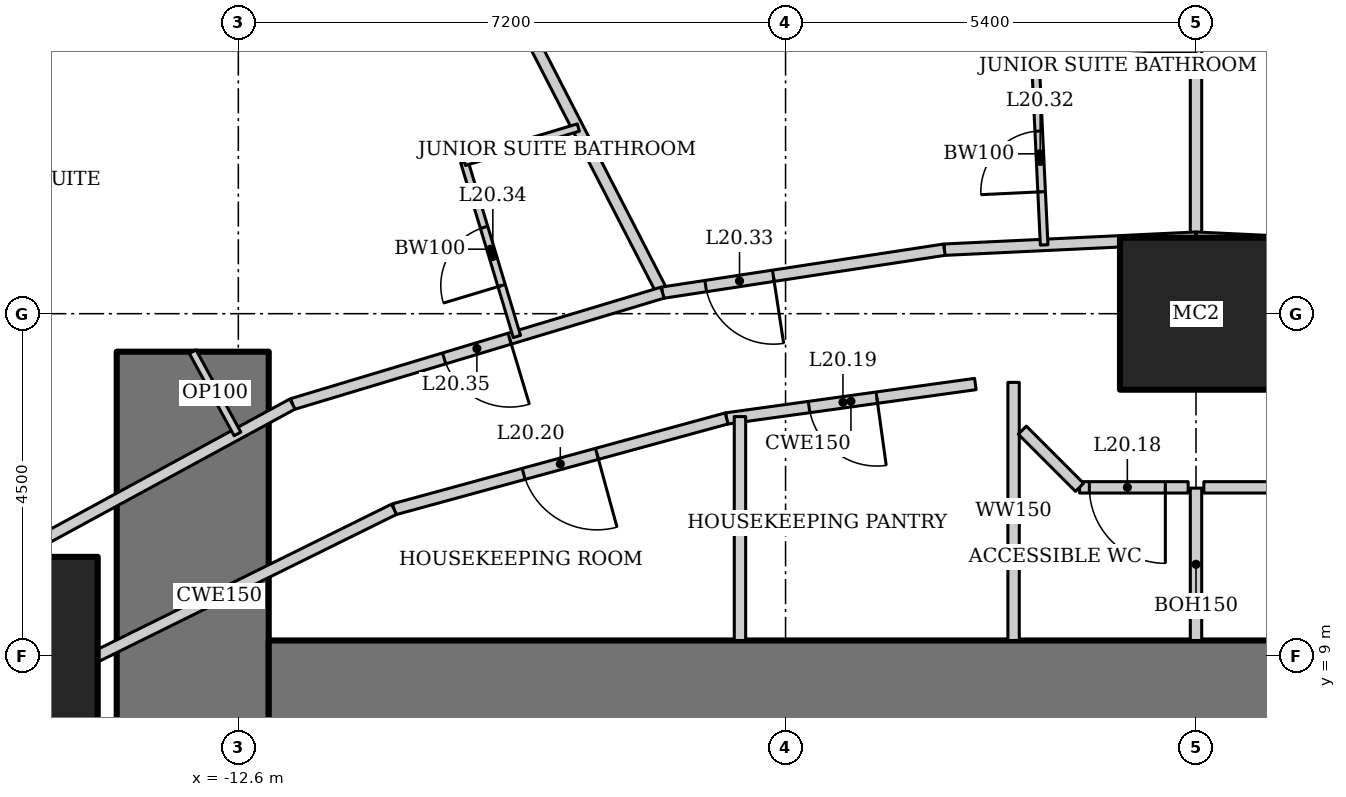
"""IFC4 building model, lengths in metres.
Left out: names, types, materials, properties, quantities, classifications, styles, units other than length and angle.
Written with IfcOpenShell. Run it as: python <this file> out.ifc"""

import sys

from ifc_helpers import new_model, si_unit, direction, frame, frame_2d, origin, origin_2d, place, context, subcontext, project, spatial, rectangle, hollow_rectangle, extrude, element, fill, save


model = new_model("IFC4")
c1 = context("Model", 3, precision=1e-05, world=origin(), true_north=direction((0.0, 1.0)))
c2 = subcontext(c1, "Body", "Model", "MODEL_VIEW")
j1 = project(units=[si_unit("LENGTHUNIT", "METRE"), si_unit("PLANEANGLEUNIT", "RADIAN")], contexts=[c1])
p1 = place(None, origin())
s1 = spatial("IfcSite", under=j1, at=p1, CompositionType="ELEMENT")
p2 = place(p1, origin())
s2 = spatial("IfcBuilding", under=s1, at=p2, CompositionType="ELEMENT")
p3 = place(p2, frame((0.0, 0.0, 87.4)))
s3 = spatial("IfcBuildingStorey", under=s2, at=p3, CompositionType="ELEMENT", Elevation=87.4)
p4 = place(p3, frame((0.0, 13.5, 0.0), z_axis=(0.0, 0.0, 1.0), x_axis=(1.0, 0.0, 0.0)))
e1 = element("IfcColumn", 1, at=p4, inside=s3, PredefinedType="COLUMN", context=c2, shape_type="SweptSolid", body=[
    extrude(hollow_rectangle(XDim=2.0, YDim=2.0, WallThickness=0.17, at=origin_2d()), origin(), (0.0, 0.0, 1.0), 3.6),
])
p5 = place(p3, frame((-15.75, 9.0, 0.0), z_axis=(0.0, 0.0, 1.0), x_axis=(1.0, 0.0, 0.0)))
e2 = element("IfcColumn", 2, at=p5, inside=s3, PredefinedType="COLUMN", context=c2, shape_type="SweptSolid", body=[
    extrude(hollow_rectangle(XDim=2.6, YDim=2.6, WallThickness=0.13, at=origin_2d()), origin(), (0.0, 0.0, 1.0), 3.6),
])
p6 = place(p3, frame((-13.2, 13.0, 0.0), z_axis=(0.0, 0.0, 1.0), x_axis=(0.0, -1.0, 0.0)))
e3 = element("IfcWall", 3, at=p6, inside=s3, PredefinedType="SHEAR", context=c2, shape_type="SweptSolid", body=[
    extrude(rectangle(XDim=26.0, YDim=2.0, at=frame_2d((13.0, 0.0))), origin(), (0.0, 0.0, 1.0), 3.6),
])
p7 = place(p6, frame((12.1, 0.0, 0.0)))
e4 = element("IfcOpeningElement", 4, at=p7, cuts=e3, PredefinedType="OPENING", context=c2, shape_type="SweptSolid", body=[
    extrude(rectangle(XDim=1.8, YDim=2.1, at=frame_2d((0.9, 1.05))), frame((0.0, 1.01, 0.0), z_axis=(0.0, -1.0, 0.0), x_axis=(1.0, 0.0, 0.0)), (0.0, 0.0, 1.0), 2.02),
])
p8 = place(p3, frame((12.2, 8.0, 0.0), z_axis=(0.0, 0.0, 1.0), x_axis=(-1.0, 0.0, 0.0)))
e5 = element("IfcWall", 5, at=p8, inside=s3, PredefinedType="SHEAR", context=c2, shape_type="SweptSolid", body=[
    extrude(rectangle(XDim=24.4, YDim=2.4, at=frame_2d((12.2, 0.0))), origin(), (0.0, 0.0, 1.0), 3.6),
])
p9 = place(p3, frame((0.0, 22.825, 0.0), z_axis=(0.0, 0.0, 1.0), x_axis=(0.0, -1.0, 0.0)))
e6 = element("IfcWall", 6, at=p9, inside=s3, PredefinedType="PARTITIONING", context=c2, shape_type="SweptSolid", body=[
    extrude(rectangle(XDim=8.325, YDim=0.15, at=frame_2d((4.162, 0.0))), origin(), (0.0, 0.0, 1.0), 2.924),
])
p10 = place(p3, frame((-10.912, 21.346, 0.0), z_axis=(0.0, 0.0, 1.0), x_axis=(0.457327273085, -0.889298468059, 0.0)))
e7 = element("IfcWall", 7, at=p10, inside=s3, PredefinedType="PARTITIONING", context=c2, shape_type="SweptSolid", body=[
    extrude(rectangle(XDim=8.511, YDim=0.15, at=frame_2d((4.256, 0.0))), origin(), (0.0, 0.0, 1.0), 2.528),
])
p11 = place(p3, frame((3.311, 14.342, 0.0), z_axis=(0.0, 0.0, 1.0), x_axis=(-0.998863968075, 0.047652631422, 0.0)))
e8 = element("IfcWall", 8, at=p11, inside=s3, PredefinedType="PARTITIONING", context=c2, shape_type="SweptSolid", body=[
    extrude(rectangle(XDim=3.315, YDim=0.15, at=frame_2d((1.657, 0.0))), origin(), (0.0, 0.0, 1.0), 3.45),
])
p12 = place(p11, frame((0.15, 0.0, 0.0)))
e9 = element("IfcOpeningElement", 9, at=p12, cuts=e8, PredefinedType="OPENING", context=c2, shape_type="SweptSolid", body=[
    extrude(rectangle(XDim=0.9, YDim=2.1, at=frame_2d((0.45, 1.05))), frame((0.0, 0.085, 0.0), z_axis=(0.0, -1.0, 0.0), x_axis=(1.0, 0.0, 0.0)), (0.0, 0.0, 1.0), 0.17),
])
p13 = place(p3, frame((0.0, 14.5, 0.0), z_axis=(0.0, 0.0, 1.0), x_axis=(-0.998863968075, -0.047652631422, 0.0)))
e10 = element("IfcWall", 10, at=p13, inside=s3, PredefinedType="PARTITIONING", context=c2, shape_type="SweptSolid", body=[
    extrude(rectangle(XDim=3.315, YDim=0.15, at=frame_2d((1.657, 0.0))), origin(), (0.0, 0.0, 1.0), 3.45),
])
p14 = place(p3, frame((-3.311, 14.342, 0.0), z_axis=(0.0, 0.0, 1.0), x_axis=(-0.988564270062, -0.150800145746, 0.0)))
e11 = element("IfcWall", 11, at=p14, inside=s3, PredefinedType="PARTITIONING", context=c2, shape_type="SweptSolid", body=[
    extrude(rectangle(XDim=3.751, YDim=0.15, at=frame_2d((1.875, 0.0))), origin(), (0.0, 0.0, 1.0), 3.45),
])
p15 = place(p14, frame((2.276, 0.0, 0.0)))
e12 = element("IfcOpeningElement", 12, at=p15, cuts=e11, PredefinedType="OPENING", context=c2, shape_type="SweptSolid", body=[
    extrude(rectangle(XDim=0.9, YDim=2.1, at=frame_2d((0.45, 1.05))), frame((0.0, 0.085, 0.0), z_axis=(0.0, -1.0, 0.0), x_axis=(1.0, 0.0, 0.0)), (0.0, 0.0, 1.0), 0.17),
])
p16 = place(p3, frame((-7.019, 13.776, 0.0), z_axis=(0.0, 0.0, 1.0), x_axis=(-0.957564241242, -0.288219922793, 0.0)))
e13 = element("IfcWall", 13, at=p16, inside=s3, PredefinedType="PARTITIONING", context=c2, shape_type="SweptSolid", body=[
    extrude(rectangle(XDim=5.085, YDim=0.15, at=frame_2d((2.542, 0.0))), origin(), (0.0, 0.0, 1.0), 3.45),
])
p17 = place(p16, frame((2.1, 0.0, 0.0)))
e14 = element("IfcOpeningElement", 14, at=p17, cuts=e13, PredefinedType="OPENING", context=c2, shape_type="SweptSolid", body=[
    extrude(rectangle(XDim=0.9, YDim=2.1, at=frame_2d((0.45, 1.05))), frame((0.0, 0.085, 0.0), z_axis=(0.0, -1.0, 0.0), x_axis=(1.0, 0.0, 0.0)), (0.0, 0.0, 1.0), 0.17),
])
p18 = place(p3, frame((-11.888, 12.311, 0.0), z_axis=(0.0, 0.0, 1.0), x_axis=(-0.878450059298, -0.477834169267, 0.0)))
e15 = element("IfcWall", 15, at=p18, inside=s3, PredefinedType="PARTITIONING", context=c2, shape_type="SweptSolid", body=[
    extrude(rectangle(XDim=5.631, YDim=0.15, at=frame_2d((2.815, 0.0))), origin(), (0.0, 0.0, 1.0), 3.45),
])
p19 = place(p3, frame((-2.903, 12.574, 0.0), z_axis=(0.0, 0.0, 1.0), x_axis=(-0.990563451353, -0.137054911782, 0.0)))
e16 = element("IfcWall", 16, at=p19, inside=s3, PredefinedType="PARTITIONING", context=c2, shape_type="SweptSolid", body=[
    extrude(rectangle(XDim=3.304, YDim=0.15, at=frame_2d((1.652, 0.0))), origin(), (0.0, 0.0, 1.0), 3.45),
])
p20 = place(p19, frame((1.308, 0.0, 0.0)))
e17 = element("IfcOpeningElement", 17, at=p20, cuts=e16, PredefinedType="OPENING", context=c2, shape_type="SweptSolid", body=[
    extrude(rectangle(XDim=0.9, YDim=2.1, at=frame_2d((0.45, 1.05))), frame((0.0, 0.085, 0.0), z_axis=(0.0, -1.0, 0.0), x_axis=(1.0, 0.0, 0.0)), (0.0, 0.0, 1.0), 0.17),
])
p21 = place(p3, frame((-6.176, 12.122, 0.0), z_axis=(0.0, 0.0, 1.0), x_axis=(-0.964644466646, -0.263554648923, 0.0)))
e18 = element("IfcWall", 18, at=p21, inside=s3, PredefinedType="PARTITIONING", context=c2, shape_type="SweptSolid", body=[
    extrude(rectangle(XDim=4.535, YDim=0.15, at=frame_2d((2.268, 0.0))), origin(), (0.0, 0.0, 1.0), 3.45),
])
p22 = place(p21, frame((1.768, 0.0, 0.0)))
e19 = element("IfcOpeningElement", 19, at=p22, cuts=e18, PredefinedType="OPENING", context=c2, shape_type="SweptSolid", body=[
    extrude(rectangle(XDim=1.0, YDim=2.1, at=frame_2d((0.5, 1.05))), frame((0.0, 0.085, 0.0), z_axis=(0.0, -1.0, 0.0), x_axis=(1.0, 0.0, 0.0)), (0.0, 0.0, 1.0), 0.17),
])
p23 = place(p3, frame((-10.551, 10.926, 0.0), z_axis=(0.0, 0.0, 1.0), x_axis=(-0.89656943448, -0.442903205177, 0.0)))
e20 = element("IfcWall", 20, at=p23, inside=s3, PredefinedType="PARTITIONING", context=c2, shape_type="SweptSolid", body=[
    extrude(rectangle(XDim=5.126, YDim=0.15, at=frame_2d((2.563, 0.0))), origin(), (0.0, 0.0, 1.0), 3.45),
])
p24 = place(p3, frame((-2.4, 9.2, 0.0), z_axis=(0.0, 0.0, 1.0), x_axis=(0.0, 1.0, 0.0)))
e21 = element("IfcWall", 21, at=p24, inside=s3, PredefinedType="SOLIDWALL", context=c2, shape_type="SweptSolid", body=[
    extrude(rectangle(XDim=3.396, YDim=0.15, at=frame_2d((1.698, 0.0))), origin(), (0.0, 0.0, 1.0), 2.767),
])
p25 = place(p3, frame((-6.0, 9.2, 0.0), z_axis=(0.0, 0.0, 1.0), x_axis=(0.0, 1.0, 0.0)))
e22 = element("IfcWall", 22, at=p25, inside=s3, PredefinedType="SOLIDWALL", context=c2, shape_type="SweptSolid", body=[
    extrude(rectangle(XDim=2.946, YDim=0.15, at=frame_2d((1.473, 0.0))), origin(), (0.0, 0.0, 1.0), 3.046),
])
p26 = place(p3, frame((-1.998, 14.405, 0.0), z_axis=(0.0, 0.0, 1.0), x_axis=(-0.047608648396, 0.998866065395, 0.0)))
e23 = element("IfcWall", 23, at=p26, inside=s3, PredefinedType="PARTITIONING", context=c2, shape_type="SweptSolid", body=[
    extrude(rectangle(XDim=2.4, YDim=0.1, at=frame_2d((1.2, 0.0))), origin(), (0.0, 0.0, 1.0), 2.749),
])
p27 = place(p26, frame((0.7, 0.0, 0.0)))
e24 = element("IfcOpeningElement", 24, at=p27, cuts=e23, PredefinedType="OPENING", context=c2, shape_type="SweptSolid", body=[
    extrude(rectangle(XDim=0.8, YDim=2.1, at=frame_2d((0.4, 1.05))), frame((0.0, 0.06, 0.0), z_axis=(0.0, -1.0, 0.0), x_axis=(1.0, 0.0, 0.0)), (0.0, 0.0, 1.0), 0.12),
])
p28 = place(p3, frame((-2.112, 16.802, 0.0), z_axis=(0.0, 0.0, 1.0), x_axis=(0.998862383453, 0.047685835668, 0.0)))
e25 = element("IfcWall", 25, at=p28, inside=s3, PredefinedType="PARTITIONING", context=c2, shape_type="SweptSolid", body=[
    extrude(rectangle(XDim=2.115, YDim=0.1, at=frame_2d((1.057, 0.0))), origin(), (0.0, 0.0, 1.0), 3.45),
])
p29 = place(p3, frame((-8.935, 13.2, 0.0), z_axis=(0.0, 0.0, 1.0), x_axis=(-0.288197066254, 0.957571120598, 0.0)))
e26 = element("IfcWall", 26, at=p29, inside=s3, PredefinedType="PARTITIONING", context=c2, shape_type="SweptSolid", body=[
    extrude(rectangle(XDim=2.4, YDim=0.1, at=frame_2d((1.2, 0.0))), origin(), (0.0, 0.0, 1.0), 3.45),
])
p30 = place(p29, frame((0.7, 0.0, 0.0)))
e27 = element("IfcOpeningElement", 27, at=p30, cuts=e26, PredefinedType="OPENING", context=c2, shape_type="SweptSolid", body=[
    extrude(rectangle(XDim=0.8, YDim=2.1, at=frame_2d((0.4, 1.05))), frame((0.0, 0.06, 0.0), z_axis=(0.0, -1.0, 0.0), x_axis=(1.0, 0.0, 0.0)), (0.0, 0.0, 1.0), 0.12),
])
p31 = place(p3, frame((-9.626, 15.498, 0.0), z_axis=(0.0, 0.0, 1.0), x_axis=(0.957551231109, 0.288263143328, 0.0)))
e28 = element("IfcWall", 28, at=p31, inside=s3, PredefinedType="PARTITIONING", context=c2, shape_type="SweptSolid", body=[
    extrude(rectangle(XDim=1.566, YDim=0.1, at=frame_2d((0.783, 0.0))), origin(), (0.0, 0.0, 1.0), 3.45),
])
p32 = place(p3, frame((-13.2, 13.0, 0.0), z_axis=(0.0, 0.0, 1.0), x_axis=(0.477852414256, -0.878440134665, 0.0)))
e29 = element("IfcWall", 29, at=p32, inside=s3, PredefinedType="PARTITIONING", context=c2, shape_type="SweptSolid", body=[
    extrude(rectangle(XDim=1.232, YDim=0.1, at=frame_2d((0.616, 0.0))), origin(), (0.0, 0.0, 1.0), 3.45),
])
p33 = place(p3, frame((0.0, 9.2, 0.0), z_axis=(0.0, 0.0, 1.0), x_axis=(0.0, 1.0, 0.0)))
e30 = element("IfcWall", 30, at=p33, inside=s3, PredefinedType="PARTITIONING", context=c2, shape_type="SweptSolid", body=[
    extrude(rectangle(XDim=2.005, YDim=0.15, at=frame_2d((1.002, 0.0))), origin(), (0.0, 0.0, 1.0), 3.044),
])
p34 = place(p3, frame((1.532, 11.215, 0.0), z_axis=(0.0, 0.0, 1.0), x_axis=(-1.0, 0.0, 0.0)))
e31 = element("IfcWall", 31, at=p34, inside=s3, PredefinedType="PARTITIONING", context=c2, shape_type="SweptSolid", body=[
    extrude(rectangle(XDim=1.429, YDim=0.15, at=frame_2d((0.714, 0.0))), origin(), (0.0, 0.0, 1.0), 3.45),
])
p35 = place(p3, frame((-0.103, 11.215, 0.0), z_axis=(0.0, 0.0, 1.0), x_axis=(-1.0, 0.0, 0.0)))
e32 = element("IfcWall", 32, at=p35, inside=s3, PredefinedType="PARTITIONING", context=c2, shape_type="SweptSolid", body=[
    extrude(rectangle(XDim=1.429, YDim=0.15, at=frame_2d((0.714, 0.0))), origin(), (0.0, 0.0, 1.0), 3.45),
])
p36 = place(p35, frame((0.3, 0.0, 0.0)))
e33 = element("IfcOpeningElement", 33, at=p36, cuts=e32, PredefinedType="OPENING", context=c2, shape_type="SweptSolid", body=[
    extrude(rectangle(XDim=1.0, YDim=2.1, at=frame_2d((0.5, 1.05))), frame((0.0, 0.085, 0.0), z_axis=(0.0, -1.0, 0.0), x_axis=(1.0, 0.0, 0.0)), (0.0, 0.0, 1.0), 0.17),
])
p37 = place(p3, frame((-1.532, 11.215, 0.0), z_axis=(0.0, 0.0, 1.0), x_axis=(-0.707106781187, 0.707106781187, 0.0)))
e34 = element("IfcWall", 34, at=p37, inside=s3, PredefinedType="PARTITIONING", context=c2, shape_type="SweptSolid", body=[
    extrude(rectangle(XDim=1.064, YDim=0.15, at=frame_2d((0.532, 0.0))), origin(), (0.0, 0.0, 1.0), 3.45),
])
p38 = place(p36, origin())
e35 = element("IfcDoor", 35, at=p38, inside=s3, OperationType="SINGLE_SWING_LEFT", PredefinedType="DOOR", context=c2, shape_type="SweptSolid", body=[
    extrude(rectangle(XDim=1.0, YDim=2.1, at=frame_2d((0.5, 1.05))), frame((0.0, 0.025, 0.0), z_axis=(0.0, -1.0, 0.0), x_axis=(1.0, 0.0, 0.0)), (0.0, 0.0, 1.0), 0.05),
])
fill(e33, e35)
p39 = place(p20, origin())
e36 = element("IfcDoor", 36, at=p39, inside=s3, OperationType="SINGLE_SWING_LEFT", PredefinedType="DOOR", context=c2, shape_type="SweptSolid", body=[
    extrude(rectangle(XDim=0.9, YDim=2.1, at=frame_2d((0.45, 1.05))), frame((0.0, 0.025, 0.0), z_axis=(0.0, -1.0, 0.0), x_axis=(1.0, 0.0, 0.0)), (0.0, 0.0, 1.0), 0.05),
])
fill(e17, e36)
p40 = place(p22, origin())
e37 = element("IfcDoor", 37, at=p40, inside=s3, OperationType="SINGLE_SWING_LEFT", PredefinedType="DOOR", context=c2, shape_type="SweptSolid", body=[
    extrude(rectangle(XDim=1.0, YDim=2.1, at=frame_2d((0.5, 1.05))), frame((0.0, 0.025, 0.0), z_axis=(0.0, -1.0, 0.0), x_axis=(1.0, 0.0, 0.0)), (0.0, 0.0, 1.0), 0.05),
])
fill(e19, e37)
p41 = place(p27, origin())
e38 = element("IfcDoor", 38, at=p41, inside=s3, OperationType="SINGLE_SWING_LEFT", PredefinedType="DOOR", context=c2, shape_type="SweptSolid", body=[
    extrude(rectangle(XDim=0.8, YDim=2.1, at=frame_2d((0.4, 1.05))), frame((0.0, 0.025, 0.0), z_axis=(0.0, -1.0, 0.0), x_axis=(1.0, 0.0, 0.0)), (0.0, 0.0, 1.0), 0.05),
])
fill(e24, e38)
p42 = place(p15, origin())
e39 = element("IfcDoor", 39, at=p42, inside=s3, OperationType="SINGLE_SWING_LEFT", PredefinedType="DOOR", context=c2, shape_type="SweptSolid", body=[
    extrude(rectangle(XDim=0.9, YDim=2.1, at=frame_2d((0.45, 1.05))), frame((0.0, 0.025, 0.0), z_axis=(0.0, -1.0, 0.0), x_axis=(1.0, 0.0, 0.0)), (0.0, 0.0, 1.0), 0.05),
])
fill(e12, e39)
p43 = place(p30, origin())
e40 = element("IfcDoor", 40, at=p43, inside=s3, OperationType="SINGLE_SWING_LEFT", PredefinedType="DOOR", context=c2, shape_type="SweptSolid", body=[
    extrude(rectangle(XDim=0.8, YDim=2.1, at=frame_2d((0.4, 1.05))), frame((0.0, 0.025, 0.0), z_axis=(0.0, -1.0, 0.0), x_axis=(1.0, 0.0, 0.0)), (0.0, 0.0, 1.0), 0.05),
])
fill(e27, e40)
p44 = place(p17, origin())
e41 = element("IfcDoor", 41, at=p44, inside=s3, OperationType="SINGLE_SWING_LEFT", PredefinedType="DOOR", context=c2, shape_type="SweptSolid", body=[
    extrude(rectangle(XDim=0.9, YDim=2.1, at=frame_2d((0.45, 1.05))), frame((0.0, 0.025, 0.0), z_axis=(0.0, -1.0, 0.0), x_axis=(1.0, 0.0, 0.0)), (0.0, 0.0, 1.0), 0.05),
])
fill(e14, e41)
save(model, sys.argv[1])
